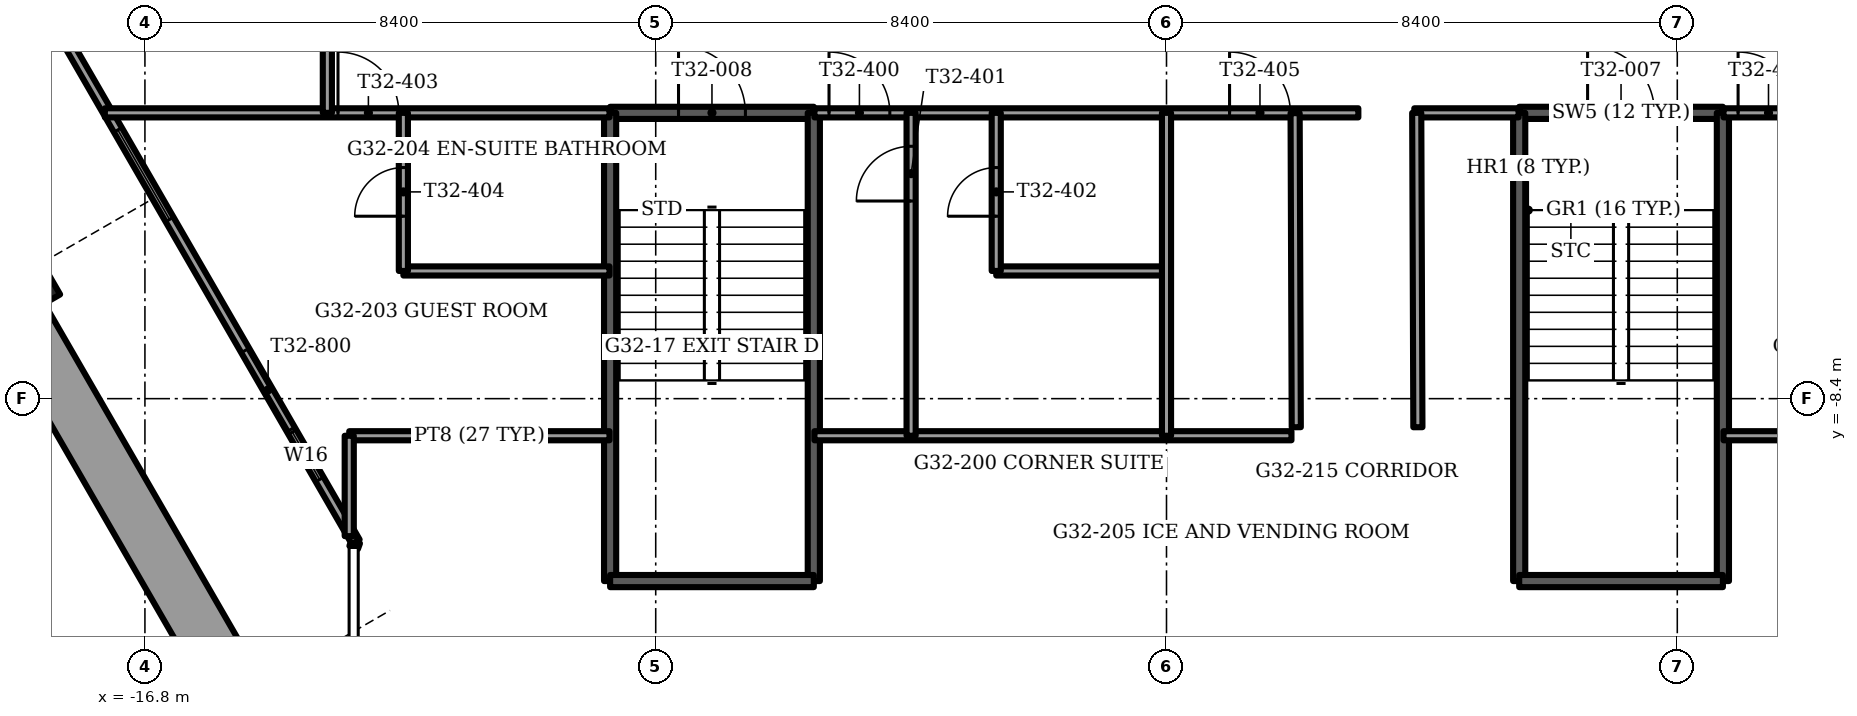
"""IFC4 building model, lengths in metres.
Left out: names, types, materials, properties, quantities, classifications, styles, units other than length and angle.
Written with IfcOpenShell. Run it as: python <this file> out.ifc"""

import sys

from ifc_helpers import new_model, si_unit, direction, frame, frame_2d, origin, origin_2d, place, context, subcontext, project, spatial, rectangle, extrude, element, fill, save


model = new_model("IFC4")
c1 = context("Model", 3, precision=1e-05, world=origin(), true_north=direction((0.0, 1.0)))
c2 = subcontext(c1, "Body", "Model", "MODEL_VIEW")
j1 = project(units=[si_unit("LENGTHUNIT", "METRE"), si_unit("PLANEANGLEUNIT", "RADIAN")], contexts=[c1])
p1 = place(None, origin())
s1 = spatial("IfcSite", under=j1, at=p1, CompositionType="ELEMENT")
p2 = place(p1, origin())
s2 = spatial("IfcBuilding", under=s1, at=p2, CompositionType="ELEMENT")
p3 = place(p2, frame((0.0, 0.0, 131.0)))
s3 = spatial("IfcBuildingStorey", under=s2, at=p3, CompositionType="ELEMENT", Elevation=131.0)
p4 = place(p3, frame((-19.014, -6.467, -1.2), z_axis=(0.0, 0.0, 1.0), x_axis=(-0.5, 0.866025403784, 0.0)))
e1 = element("IfcColumn", 1, at=p4, inside=s3, PredefinedType="COLUMN", context=c2, shape_type="SweptSolid", body=[
    extrude(rectangle(XDim=1.2, YDim=1.2, at=origin_2d()), origin(), (0.0, 0.0, 1.0), 3.75),
])
p5 = place(p3, frame((-18.859, -7.035, 0.0), z_axis=(0.0, 0.0, 1.0), x_axis=(0.499999023957, -0.866025967302, 0.0)))
e2 = element("IfcWall", 2, at=p5, inside=s3, PredefinedType="PARAPET", context=c2, shape_type="SweptSolid", body=[
    extrude(rectangle(XDim=6.673, YDim=0.9, at=frame_2d((3.337, 0.0))), origin(), (0.0, 0.0, 1.0), 1.1),
])
p6 = place(p3, frame((-18.663, -1.525, 0.0), z_axis=(0.0, 0.0, 1.0), x_axis=(0.499997430087, -0.866026887519, 0.0)))
e3 = element("IfcWall", 3, at=p6, inside=s3, PredefinedType="SOLIDWALL", context=c2, shape_type="SweptSolid", body=[
    extrude(rectangle(XDim=10.657, YDim=0.15, at=frame_2d((5.329, 0.0))), origin(), (0.0, 0.0, 1.0), 3.45),
])
p7 = place(p6, frame((2.835, 0.0, 0.15)))
e4 = element("IfcOpeningElement", 4, at=p7, cuts=e3, PredefinedType="OPENING", context=c2, shape_type="SweptSolid", body=[
    extrude(rectangle(XDim=1.7, YDim=2.2, at=frame_2d((0.85, 1.1))), frame((0.0, 0.075, 0.0), z_axis=(0.0, -1.0, 0.0), x_axis=(1.0, 0.0, 0.0)), (0.0, 0.0, 1.0), 0.15),
])
p8 = place(p6, frame((8.573, 0.0, 0.15)))
e5 = element("IfcOpeningElement", 5, at=p8, cuts=e3, PredefinedType="OPENING", context=c2, shape_type="SweptSolid", body=[
    extrude(rectangle(XDim=0.9, YDim=2.2, at=frame_2d((0.45, 1.1))), frame((0.0, 0.075, 0.0), z_axis=(0.0, -1.0, 0.0), x_axis=(1.0, 0.0, 0.0)), (0.0, 0.0, 1.0), 0.15),
])
p9 = place(p6, frame((7.023, 0.0, 0.0)))
e6 = element("IfcOpeningElement", 6, at=p9, cuts=e3, PredefinedType="OPENING", context=c2, shape_type="SweptSolid", body=[
    extrude(rectangle(XDim=1.5, YDim=2.4, at=frame_2d((0.75, 1.2))), frame((0.0, 0.075, 0.0), z_axis=(0.0, -1.0, 0.0), x_axis=(1.0, 0.0, 0.0)), (0.0, 0.0, 1.0), 0.15),
])
p10 = place(p3, frame((-13.334, -10.755, 0.0), z_axis=(0.0, 0.0, 1.0), x_axis=(-0.337751931921, -0.941235163221, 0.0)))
e7 = element("IfcWall", 7, at=p10, inside=s3, PredefinedType="SOLIDWALL", context=c2, shape_type="SweptSolid", body=[
    extrude(rectangle(XDim=0.098, YDim=0.15, at=frame_2d((0.049, 0.0))), origin(), (0.0, 0.0, 1.0), 3.45),
])
p11 = place(p3, frame((5.8, -3.7, -0.3), z_axis=(0.0, 0.0, 1.0), x_axis=(1.0, 0.0, 0.0)))
e8 = element("IfcWall", 8, at=p11, inside=s3, PredefinedType="SOLIDWALL", context=c2, shape_type="SweptSolid", body=[
    extrude(rectangle(XDim=3.35, YDim=0.2, at=frame_2d((1.675, 0.0))), origin(), (0.0, 0.0, 1.0), 3.75),
])
p12 = place(p11, frame((1.125, 0.0, 0.0)))
e9 = element("IfcOpeningElement", 9, at=p12, cuts=e8, PredefinedType="OPENING", context=c2, shape_type="SweptSolid", body=[
    extrude(rectangle(XDim=1.1, YDim=2.1, at=frame_2d((0.55, 1.05))), frame((0.0, 0.1, 0.0), z_axis=(0.0, -1.0, 0.0), x_axis=(1.0, 0.0, 0.0)), (0.0, 0.0, 1.0), 0.2),
])
for number, where, z_axis, x_axis in (
    (10, (5.8, -3.7, -0.3), (0.0, 0.0, 1.0), (0.0, -1.0, 0.0)),
    (11, (9.15, -3.7, -0.3), (0.0, 0.0, 1.0), (0.0, -1.0, 0.0)),
):
    element("IfcWall", number, at=place(p3, frame(where, z_axis=z_axis, x_axis=x_axis)), inside=s3, PredefinedType="SOLIDWALL", context=c2, shape_type="SweptSolid", body=[
        extrude(rectangle(XDim=7.7, YDim=0.2, at=frame_2d((3.85, 0.0))), origin(), (0.0, 0.0, 1.0), 3.75),
    ])
p13 = place(p3, frame((5.8, -11.4, -0.3), z_axis=(0.0, 0.0, 1.0), x_axis=(1.0, 0.0, 0.0)))
e12 = element("IfcWall", 12, at=p13, inside=s3, PredefinedType="SOLIDWALL", context=c2, shape_type="SweptSolid", body=[
    extrude(rectangle(XDim=3.35, YDim=0.2, at=frame_2d((1.675, 0.0))), origin(), (0.0, 0.0, 1.0), 3.75),
])
p14 = place(p3, frame((-9.15, -3.7, -0.3), z_axis=(0.0, 0.0, 1.0), x_axis=(1.0, 0.0, 0.0)))
e13 = element("IfcWall", 13, at=p14, inside=s3, PredefinedType="SOLIDWALL", context=c2, shape_type="SweptSolid", body=[
    extrude(rectangle(XDim=3.35, YDim=0.2, at=frame_2d((1.675, 0.0))), origin(), (0.0, 0.0, 1.0), 3.75),
])
p15 = place(p14, frame((1.125, 0.0, 0.0)))
e14 = element("IfcOpeningElement", 14, at=p15, cuts=e13, PredefinedType="OPENING", context=c2, shape_type="SweptSolid", body=[
    extrude(rectangle(XDim=1.1, YDim=2.1, at=frame_2d((0.55, 1.05))), frame((0.0, 0.1, 0.0), z_axis=(0.0, -1.0, 0.0), x_axis=(1.0, 0.0, 0.0)), (0.0, 0.0, 1.0), 0.2),
])
for number, where, z_axis, x_axis in (
    (15, (-9.15, -3.7, -0.3), (0.0, 0.0, 1.0), (0.0, -1.0, 0.0)),
    (16, (-5.8, -3.7, -0.3), (0.0, 0.0, 1.0), (0.0, -1.0, 0.0)),
):
    element("IfcWall", number, at=place(p3, frame(where, z_axis=z_axis, x_axis=x_axis)), inside=s3, PredefinedType="SOLIDWALL", context=c2, shape_type="SweptSolid", body=[
        extrude(rectangle(XDim=7.7, YDim=0.2, at=frame_2d((3.85, 0.0))), origin(), (0.0, 0.0, 1.0), 3.75),
    ])
p16 = place(p3, frame((-9.15, -11.4, -0.3), z_axis=(0.0, 0.0, 1.0), x_axis=(1.0, 0.0, 0.0)))
e17 = element("IfcWall", 17, at=p16, inside=s3, PredefinedType="SOLIDWALL", context=c2, shape_type="SweptSolid", body=[
    extrude(rectangle(XDim=3.35, YDim=0.2, at=frame_2d((1.675, 0.0))), origin(), (0.0, 0.0, 1.0), 3.75),
])
p17 = place(p3, frame((-13.44, -9.01, 0.0), z_axis=(0.0, 0.0, 1.0), x_axis=(1.0, 0.0, 0.0)))
e18 = element("IfcWall", 18, at=p17, inside=s3, PredefinedType="PARTITIONING", context=c2, shape_type="SweptSolid", body=[
    extrude(rectangle(XDim=4.28, YDim=0.15, at=frame_2d((2.14, 0.0))), origin(), (0.0, 0.0, 1.0), 3.45),
])
p18 = place(p3, frame((-5.79, -9.01, 0.0), z_axis=(0.0, 0.0, 1.0), x_axis=(1.0, 0.0, 0.0)))
e19 = element("IfcWall", 19, at=p18, inside=s3, PredefinedType="PARTITIONING", context=c2, shape_type="SweptSolid", body=[
    extrude(rectangle(XDim=7.845, YDim=0.15, at=frame_2d((3.922, 0.0))), origin(), (0.0, 0.0, 1.0), 3.45),
])
p19 = place(p3, frame((9.16, -9.01, 0.0), z_axis=(0.0, 0.0, 1.0), x_axis=(1.0, 0.0, 0.0)))
e20 = element("IfcWall", 20, at=p19, inside=s3, PredefinedType="PARTITIONING", context=c2, shape_type="SweptSolid", body=[
    extrude(rectangle(XDim=4.28, YDim=0.15, at=frame_2d((2.14, 0.0))), origin(), (0.0, 0.0, 1.0), 3.45),
])
p20 = place(p3, frame((-12.55, -6.3, 0.0), z_axis=(0.0, 0.0, 1.0), x_axis=(1.0, 0.0, 0.0)))
e21 = element("IfcWall", 21, at=p20, inside=s3, PredefinedType="PARTITIONING", context=c2, shape_type="SweptSolid", body=[
    extrude(rectangle(XDim=3.39, YDim=0.15, at=frame_2d((1.695, 0.0))), origin(), (0.0, 0.0, 1.0), 3.45),
])
p21 = place(p3, frame((-2.8, -6.3, 0.0), z_axis=(0.0, 0.0, 1.0), x_axis=(1.0, 0.0, 0.0)))
e22 = element("IfcWall", 22, at=p21, inside=s3, PredefinedType="PARTITIONING", context=c2, shape_type="SweptSolid", body=[
    extrude(rectangle(XDim=2.8, YDim=0.15, at=frame_2d((1.4, 0.0))), origin(), (0.0, 0.0, 1.0), 3.45),
])
p22 = place(p3, frame((-17.459, -3.7, 0.0), z_axis=(0.0, 0.0, 1.0), x_axis=(1.0, 0.0, 0.0)))
e23 = element("IfcWall", 23, at=p22, inside=s3, PredefinedType="PARTITIONING", context=c2, shape_type="SweptSolid", body=[
    extrude(rectangle(XDim=8.299, YDim=0.15, at=frame_2d((4.149, 0.0))), origin(), (0.0, 0.0, 1.0), 3.45),
])
p23 = place(p22, frame((3.834, 0.0, 0.0)))
e24 = element("IfcOpeningElement", 24, at=p23, cuts=e23, PredefinedType="OPENING", context=c2, shape_type="SweptSolid", body=[
    extrude(rectangle(XDim=1.0, YDim=2.1, at=frame_2d((0.5, 1.05))), frame((0.0, 0.075, 0.0), z_axis=(0.0, -1.0, 0.0), x_axis=(1.0, 0.0, 0.0)), (0.0, 0.0, 1.0), 0.15),
])
p24 = place(p3, frame((-5.79, -3.7, 0.0), z_axis=(0.0, 0.0, 1.0), x_axis=(1.0, 0.0, 0.0)))
e25 = element("IfcWall", 25, at=p24, inside=s3, PredefinedType="PARTITIONING", context=c2, shape_type="SweptSolid", body=[
    extrude(rectangle(XDim=8.945, YDim=0.15, at=frame_2d((4.473, 0.0))), origin(), (0.0, 0.0, 1.0), 3.45),
])
p25 = place(p24, frame((0.24, 0.0, 0.0)))
e26 = element("IfcOpeningElement", 26, at=p25, cuts=e25, PredefinedType="OPENING", context=c2, shape_type="SweptSolid", body=[
    extrude(rectangle(XDim=1.0, YDim=2.1, at=frame_2d((0.5, 1.05))), frame((0.0, 0.075, 0.0), z_axis=(0.0, -1.0, 0.0), x_axis=(1.0, 0.0, 0.0)), (0.0, 0.0, 1.0), 0.15),
])
p26 = place(p24, frame((6.827, 0.0, 0.0)))
e27 = element("IfcOpeningElement", 27, at=p26, cuts=e25, PredefinedType="OPENING", context=c2, shape_type="SweptSolid", body=[
    extrude(rectangle(XDim=1.0, YDim=2.1, at=frame_2d((0.5, 1.05))), frame((0.0, 0.075, 0.0), z_axis=(0.0, -1.0, 0.0), x_axis=(1.0, 0.0, 0.0)), (0.0, 0.0, 1.0), 0.15),
])
p27 = place(p3, frame((4.075, -3.7, 0.0), z_axis=(0.0, 0.0, 1.0), x_axis=(1.0, 0.0, 0.0)))
e28 = element("IfcWall", 28, at=p27, inside=s3, PredefinedType="PARTITIONING", context=c2, shape_type="SweptSolid", body=[
    extrude(rectangle(XDim=1.715, YDim=0.15, at=frame_2d((0.857, 0.0))), origin(), (0.0, 0.0, 1.0), 3.45),
])
p28 = place(p3, frame((9.16, -3.7, 0.0), z_axis=(0.0, 0.0, 1.0), x_axis=(1.0, 0.0, 0.0)))
e29 = element("IfcWall", 29, at=p28, inside=s3, PredefinedType="PARTITIONING", context=c2, shape_type="SweptSolid", body=[
    extrude(rectangle(XDim=8.299, YDim=0.15, at=frame_2d((4.149, 0.0))), origin(), (0.0, 0.0, 1.0), 3.45),
])
p29 = place(p28, frame((0.24, 0.0, 0.0)))
e30 = element("IfcOpeningElement", 30, at=p29, cuts=e29, PredefinedType="OPENING", context=c2, shape_type="SweptSolid", body=[
    extrude(rectangle(XDim=1.0, YDim=2.1, at=frame_2d((0.5, 1.05))), frame((0.0, 0.075, 0.0), z_axis=(0.0, -1.0, 0.0), x_axis=(1.0, 0.0, 0.0)), (0.0, 0.0, 1.0), 0.15),
])
p30 = place(p3, frame((0.0, -9.01, 0.0), z_axis=(0.0, 0.0, 1.0), x_axis=(0.0, 1.0, 0.0)))
e31 = element("IfcWall", 31, at=p30, inside=s3, PredefinedType="PARTITIONING", context=c2, shape_type="SweptSolid", body=[
    extrude(rectangle(XDim=5.31, YDim=0.15, at=frame_2d((2.655, 0.0))), origin(), (0.0, 0.0, 1.0), 3.45),
])
p31 = place(p3, frame((-2.8, -6.3, 0.0), z_axis=(0.0, 0.0, 1.0), x_axis=(0.0, 1.0, 0.0)))
e32 = element("IfcWall", 32, at=p31, inside=s3, PredefinedType="PARTITIONING", context=c2, shape_type="SweptSolid", body=[
    extrude(rectangle(XDim=2.6, YDim=0.15, at=frame_2d((1.3, 0.0))), origin(), (0.0, 0.0, 1.0), 3.45),
])
p32 = place(p31, frame((0.9, 0.0, 0.0)))
e33 = element("IfcOpeningElement", 33, at=p32, cuts=e32, PredefinedType="OPENING", context=c2, shape_type="SweptSolid", body=[
    extrude(rectangle(XDim=0.8, YDim=2.1, at=frame_2d((0.4, 1.05))), frame((0.0, 0.075, 0.0), z_axis=(0.0, -1.0, 0.0), x_axis=(1.0, 0.0, 0.0)), (0.0, 0.0, 1.0), 0.15),
])
p33 = place(p3, frame((-4.2, -9.01, 0.0), z_axis=(0.0, 0.0, 1.0), x_axis=(0.0, 1.0, 0.0)))
e34 = element("IfcWall", 34, at=p33, inside=s3, PredefinedType="PARTITIONING", context=c2, shape_type="SweptSolid", body=[
    extrude(rectangle(XDim=5.31, YDim=0.15, at=frame_2d((2.655, 0.0))), origin(), (0.0, 0.0, 1.0), 3.45),
])
p34 = place(p33, frame((3.86, 0.0, 0.0)))
e35 = element("IfcOpeningElement", 35, at=p34, cuts=e34, PredefinedType="OPENING", context=c2, shape_type="SweptSolid", body=[
    extrude(rectangle(XDim=0.9, YDim=2.1, at=frame_2d((0.45, 1.05))), frame((0.0, 0.075, 0.0), z_axis=(0.0, -1.0, 0.0), x_axis=(1.0, 0.0, 0.0)), (0.0, 0.0, 1.0), 0.15),
])
p35 = place(p3, frame((-12.55, -6.3, 0.0), z_axis=(0.0, 0.0, 1.0), x_axis=(0.0, 1.0, 0.0)))
e36 = element("IfcWall", 36, at=p35, inside=s3, PredefinedType="PARTITIONING", context=c2, shape_type="SweptSolid", body=[
    extrude(rectangle(XDim=2.6, YDim=0.15, at=frame_2d((1.3, 0.0))), origin(), (0.0, 0.0, 1.0), 3.45),
])
p36 = place(p35, frame((0.9, 0.0, 0.0)))
e37 = element("IfcOpeningElement", 37, at=p36, cuts=e36, PredefinedType="OPENING", context=c2, shape_type="SweptSolid", body=[
    extrude(rectangle(XDim=0.8, YDim=2.1, at=frame_2d((0.4, 1.05))), frame((0.0, 0.075, 0.0), z_axis=(0.0, -1.0, 0.0), x_axis=(1.0, 0.0, 0.0)), (0.0, 0.0, 1.0), 0.15),
])
p37 = place(p3, frame((-13.44, -10.661, 0.0), z_axis=(0.0, 0.0, 1.0), x_axis=(0.0, 1.0, 0.0)))
e38 = element("IfcWall", 38, at=p37, inside=s3, PredefinedType="PARTITIONING", context=c2, shape_type="SweptSolid", body=[
    extrude(rectangle(XDim=1.651, YDim=0.15, at=frame_2d((0.825, 0.0))), origin(), (0.0, 0.0, 1.0), 3.45),
])
p38 = place(p3, frame((-13.8, -3.7, 0.0), z_axis=(0.0, 0.0, 1.0), x_axis=(0.0, 1.0, 0.0)))
e39 = element("IfcWall", 39, at=p38, inside=s3, PredefinedType="PARTITIONING", context=c2, shape_type="SweptSolid", body=[
    extrude(rectangle(XDim=11.752, YDim=0.15, at=frame_2d((5.876, 0.0))), origin(), (0.0, 0.0, 1.0), 3.45),
])
p39 = place(p38, frame((1.6, 0.0, 0.0)))
e40 = element("IfcOpeningElement", 40, at=p39, cuts=e39, PredefinedType="OPENING", context=c2, shape_type="SweptSolid", body=[
    extrude(rectangle(XDim=1.0, YDim=2.1, at=frame_2d((0.5, 1.05))), frame((0.0, 0.075, 0.0), z_axis=(0.0, -1.0, 0.0), x_axis=(1.0, 0.0, 0.0)), (0.0, 0.0, 1.0), 0.15),
])
p40 = place(p38, frame((7.353, 0.0, 0.0)))
e41 = element("IfcOpeningElement", 41, at=p40, cuts=e39, PredefinedType="OPENING", context=c2, shape_type="SweptSolid", body=[
    extrude(rectangle(XDim=1.0, YDim=2.1, at=frame_2d((0.5, 1.05))), frame((0.0, 0.075, 0.0), z_axis=(0.0, -1.0, 0.0), x_axis=(1.0, 0.0, 0.0)), (0.0, 0.0, 1.0), 0.15),
])
p41 = place(p3, frame((4.134, -8.87, 0.0), z_axis=(0.0, 0.0, 1.0), x_axis=(-0.003683216269, 0.999993216936, 0.0)))
e42 = element("IfcWall", 42, at=p41, inside=s3, PredefinedType="PARTITIONING", context=c2, shape_type="SweptSolid", body=[
    extrude(rectangle(XDim=5.17, YDim=0.15, at=frame_2d((2.585, 0.0))), origin(), (0.0, 0.0, 1.0), 3.45),
])
p42 = place(p3, frame((2.134, -8.87, 0.0), z_axis=(0.0, 0.0, 1.0), x_axis=(-0.003686872276, 0.999993203463, 0.0)))
e43 = element("IfcWall", 43, at=p42, inside=s3, PredefinedType="PARTITIONING", context=c2, shape_type="SweptSolid", body=[
    extrude(rectangle(XDim=5.165, YDim=0.15, at=frame_2d((2.583, 0.0))), origin(), (0.0, 0.0, 1.0), 3.45),
])
p43 = place(p7, origin())
e44 = element("IfcWindow", 44, at=p43, inside=s3, PartitioningType="SINGLE_PANEL", PredefinedType="WINDOW", context=c2, shape_type="SweptSolid", body=[
    extrude(rectangle(XDim=1.7, YDim=2.2, at=frame_2d((0.85, 1.1))), frame((0.0, 0.03, 0.0), z_axis=(0.0, -1.0, 0.0), x_axis=(1.0, 0.0, 0.0)), (0.0, 0.0, 1.0), 0.06),
])
fill(e4, e44)
p44 = place(p8, origin())
e45 = element("IfcWindow", 45, at=p44, inside=s3, PartitioningType="SINGLE_PANEL", PredefinedType="WINDOW", context=c2, shape_type="SweptSolid", body=[
    extrude(rectangle(XDim=0.9, YDim=2.2, at=frame_2d((0.45, 1.1))), frame((0.0, 0.03, 0.0), z_axis=(0.0, -1.0, 0.0), x_axis=(1.0, 0.0, 0.0)), (0.0, 0.0, 1.0), 0.06),
])
fill(e5, e45)
p45 = place(p9, origin())
e46 = element("IfcDoor", 46, at=p45, inside=s3, OperationType="SLIDING_TO_RIGHT", PredefinedType="DOOR", context=c2, shape_type="SweptSolid", body=[
    extrude(rectangle(XDim=1.5, YDim=2.4, at=frame_2d((0.75, 1.2))), frame((0.0, 0.025, 0.0), z_axis=(0.0, -1.0, 0.0), x_axis=(1.0, 0.0, 0.0)), (0.0, 0.0, 1.0), 0.05),
])
fill(e6, e46)
p46 = place(p12, origin())
e47 = element("IfcDoor", 47, at=p46, inside=s3, OperationType="SINGLE_SWING_LEFT", PredefinedType="DOOR", context=c2, shape_type="SweptSolid", body=[
    extrude(rectangle(XDim=1.1, YDim=2.1, at=frame_2d((0.55, 1.05))), frame((0.0, 0.025, 0.0), z_axis=(0.0, -1.0, 0.0), x_axis=(1.0, 0.0, 0.0)), (0.0, 0.0, 1.0), 0.05),
])
fill(e9, e47)
p47 = place(p15, origin())
e48 = element("IfcDoor", 48, at=p47, inside=s3, OperationType="SINGLE_SWING_LEFT", PredefinedType="DOOR", context=c2, shape_type="SweptSolid", body=[
    extrude(rectangle(XDim=1.1, YDim=2.1, at=frame_2d((0.55, 1.05))), frame((0.0, 0.025, 0.0), z_axis=(0.0, -1.0, 0.0), x_axis=(1.0, 0.0, 0.0)), (0.0, 0.0, 1.0), 0.05),
])
fill(e14, e48)
p48 = place(p25, origin())
e49 = element("IfcDoor", 49, at=p48, inside=s3, OperationType="SINGLE_SWING_LEFT", PredefinedType="DOOR", context=c2, shape_type="SweptSolid", body=[
    extrude(rectangle(XDim=1.0, YDim=2.1, at=frame_2d((0.5, 1.05))), frame((0.0, 0.025, 0.0), z_axis=(0.0, -1.0, 0.0), x_axis=(1.0, 0.0, 0.0)), (0.0, 0.0, 1.0), 0.05),
])
fill(e26, e49)
p49 = place(p34, origin())
e50 = element("IfcDoor", 50, at=p49, inside=s3, OperationType="SINGLE_SWING_RIGHT", PredefinedType="DOOR", context=c2, shape_type="SweptSolid", body=[
    extrude(rectangle(XDim=0.9, YDim=2.1, at=frame_2d((0.45, 1.05))), frame((0.0, 0.025, 0.0), z_axis=(0.0, -1.0, 0.0), x_axis=(1.0, 0.0, 0.0)), (0.0, 0.0, 1.0), 0.05),
])
fill(e35, e50)
p50 = place(p32, origin())
e51 = element("IfcDoor", 51, at=p50, inside=s3, OperationType="SINGLE_SWING_RIGHT", PredefinedType="DOOR", context=c2, shape_type="SweptSolid", body=[
    extrude(rectangle(XDim=0.8, YDim=2.1, at=frame_2d((0.4, 1.05))), frame((0.0, 0.025, 0.0), z_axis=(0.0, -1.0, 0.0), x_axis=(1.0, 0.0, 0.0)), (0.0, 0.0, 1.0), 0.05),
])
fill(e33, e51)
p51 = place(p23, origin())
e52 = element("IfcDoor", 52, at=p51, inside=s3, OperationType="SINGLE_SWING_LEFT", PredefinedType="DOOR", context=c2, shape_type="SweptSolid", body=[
    extrude(rectangle(XDim=1.0, YDim=2.1, at=frame_2d((0.5, 1.05))), frame((0.0, 0.025, 0.0), z_axis=(0.0, -1.0, 0.0), x_axis=(1.0, 0.0, 0.0)), (0.0, 0.0, 1.0), 0.05),
])
fill(e24, e52)
p52 = place(p36, origin())
e53 = element("IfcDoor", 53, at=p52, inside=s3, OperationType="SINGLE_SWING_RIGHT", PredefinedType="DOOR", context=c2, shape_type="SweptSolid", body=[
    extrude(rectangle(XDim=0.8, YDim=2.1, at=frame_2d((0.4, 1.05))), frame((0.0, 0.025, 0.0), z_axis=(0.0, -1.0, 0.0), x_axis=(1.0, 0.0, 0.0)), (0.0, 0.0, 1.0), 0.05),
])
fill(e37, e53)
p53 = place(p26, origin())
e54 = element("IfcDoor", 54, at=p53, inside=s3, OperationType="SINGLE_SWING_LEFT", PredefinedType="DOOR", context=c2, shape_type="SweptSolid", body=[
    extrude(rectangle(XDim=1.0, YDim=2.1, at=frame_2d((0.5, 1.05))), frame((0.0, 0.025, 0.0), z_axis=(0.0, -1.0, 0.0), x_axis=(1.0, 0.0, 0.0)), (0.0, 0.0, 1.0), 0.05),
])
fill(e27, e54)
p54 = place(p29, origin())
e55 = element("IfcDoor", 55, at=p54, inside=s3, OperationType="SINGLE_SWING_LEFT", PredefinedType="DOOR", context=c2, shape_type="SweptSolid", body=[
    extrude(rectangle(XDim=1.0, YDim=2.1, at=frame_2d((0.5, 1.05))), frame((0.0, 0.025, 0.0), z_axis=(0.0, -1.0, 0.0), x_axis=(1.0, 0.0, 0.0)), (0.0, 0.0, 1.0), 0.05),
])
fill(e30, e55)
save(model, sys.argv[1])
